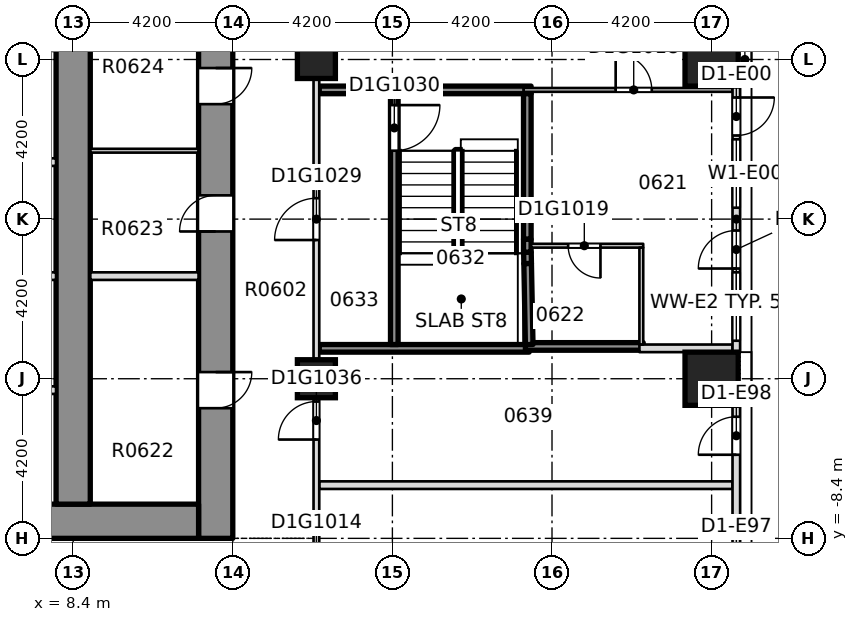
"""IFC4 building model, lengths in metres.
Left out: names, types, materials, properties, quantities, classifications, styles, units other than length and angle.
Written with IfcOpenShell. Run it as: python <this file> out.ifc"""

import sys

from ifc_helpers import new_model, si_unit, direction, frame, frame_2d, origin, origin_2d, place, context, subcontext, project, spatial, rectangle, extrude, element, fill, save


model = new_model("IFC4")
c1 = context("Model", 3, precision=1e-05, world=origin(), true_north=direction((0.0, 1.0)))
c2 = subcontext(c1, "Body", "Model", "MODEL_VIEW")
j1 = project(units=[si_unit("LENGTHUNIT", "METRE"), si_unit("PLANEANGLEUNIT", "RADIAN")], contexts=[c1])
p1 = place(None, origin())
s1 = spatial("IfcSite", under=j1, at=p1, CompositionType="ELEMENT")
p2 = place(p1, origin())
s2 = spatial("IfcBuilding", under=s1, at=p2, CompositionType="ELEMENT")
p3 = place(p2, frame((0.0, 0.0, 34.5)))
s3 = spatial("IfcBuildingStorey", under=s2, at=p3, CompositionType="ELEMENT", Elevation=34.5)
p4 = place(p3, frame((12.15, -8.4, -0.32), z_axis=(0.0, 0.0, 1.0), x_axis=(0.0, 1.0, 0.0)))
e1 = element("IfcWall", 1, at=p4, inside=s3, PredefinedType="SHEAR", context=c2, shape_type="SweptSolid", body=[
    extrude(rectangle(XDim=30.15, YDim=0.9, at=frame_2d((15.075, 0.0))), origin(), (0.0, 0.0, 1.0), 3.45),
])
p5 = place(p4, frame((3.425, 0.0, 0.32)))
e2 = element("IfcOpeningElement", 2, at=p5, cuts=e1, PredefinedType="OPENING", context=c2, shape_type="SweptSolid", body=[
    extrude(rectangle(XDim=0.95, YDim=2.1, at=frame_2d((0.475, 1.05))), frame((0.0, 0.46, 0.0), z_axis=(0.0, -1.0, 0.0), x_axis=(1.0, 0.0, 0.0)), (0.0, 0.0, 1.0), 0.92),
])
p6 = place(p4, frame((8.075, 0.0, 0.32)))
e3 = element("IfcOpeningElement", 3, at=p6, cuts=e1, PredefinedType="OPENING", context=c2, shape_type="SweptSolid", body=[
    extrude(rectangle(XDim=0.95, YDim=2.1, at=frame_2d((0.475, 1.05))), frame((0.0, 0.46, 0.0), z_axis=(0.0, -1.0, 0.0), x_axis=(1.0, 0.0, 0.0)), (0.0, 0.0, 1.0), 0.92),
])
p7 = place(p4, frame((11.425, 0.0, 0.32)))
e4 = element("IfcOpeningElement", 4, at=p7, cuts=e1, PredefinedType="OPENING", context=c2, shape_type="SweptSolid", body=[
    extrude(rectangle(XDim=0.95, YDim=2.1, at=frame_2d((0.475, 1.05))), frame((0.0, 0.46, 0.0), z_axis=(0.0, -1.0, 0.0), x_axis=(1.0, 0.0, 0.0)), (0.0, 0.0, 1.0), 0.92),
])
p8 = place(p4, frame((15.625, 0.0, 0.32)))
e5 = element("IfcOpeningElement", 5, at=p8, cuts=e1, PredefinedType="OPENING", context=c2, shape_type="SweptSolid", body=[
    extrude(rectangle(XDim=0.95, YDim=2.1, at=frame_2d((0.475, 1.05))), frame((0.0, 0.46, 0.0), z_axis=(0.0, -1.0, 0.0), x_axis=(1.0, 0.0, 0.0)), (0.0, 0.0, 1.0), 0.92),
])
p9 = place(p4, frame((22.725, 0.0, 0.32)))
e6 = element("IfcOpeningElement", 6, at=p9, cuts=e1, PredefinedType="OPENING", context=c2, shape_type="SweptSolid", body=[
    extrude(rectangle(XDim=0.95, YDim=2.1, at=frame_2d((0.475, 1.05))), frame((0.0, 0.46, 0.0), z_axis=(0.0, -1.0, 0.0), x_axis=(1.0, 0.0, 0.0)), (0.0, 0.0, 1.0), 0.92),
])
p10 = place(p4, frame((26.75, 0.0, 0.32)))
e7 = element("IfcOpeningElement", 7, at=p10, cuts=e1, PredefinedType="OPENING", context=c2, shape_type="SweptSolid", body=[
    extrude(rectangle(XDim=0.95, YDim=2.1, at=frame_2d((0.475, 1.05))), frame((0.0, 0.46, 0.0), z_axis=(0.0, -1.0, 0.0), x_axis=(1.0, 0.0, 0.0)), (0.0, 0.0, 1.0), 0.92),
])
p11 = place(p4, frame((19.3, 0.0, 0.32)))
e8 = element("IfcOpeningElement", 8, at=p11, cuts=e1, PredefinedType="OPENING", context=c2, shape_type="SweptSolid", body=[
    extrude(rectangle(XDim=1.2, YDim=2.1, at=frame_2d((0.6, 1.05))), frame((0.0, 0.46, 0.0), z_axis=(0.0, -1.0, 0.0), x_axis=(1.0, 0.0, 0.0)), (0.0, 0.0, 1.0), 0.92),
])
p12 = place(p3, frame((-11.7, -7.95, -0.32), z_axis=(0.0, 0.0, 1.0), x_axis=(1.0, 0.0, 0.0)))
e9 = element("IfcWall", 9, at=p12, inside=s3, PredefinedType="SHEAR", context=c2, shape_type="SweptSolid", body=[
    extrude(rectangle(XDim=23.4, YDim=0.9, at=frame_2d((11.7, 0.0))), origin(), (0.0, 0.0, 1.0), 3.45),
])
p13 = place(p12, frame((6.95, 0.0, 0.32)))
e10 = element("IfcOpeningElement", 10, at=p13, cuts=e9, PredefinedType="OPENING", context=c2, shape_type="SweptSolid", body=[
    extrude(rectangle(XDim=1.8, YDim=2.1, at=frame_2d((0.9, 1.05))), frame((0.0, 0.46, 0.0), z_axis=(0.0, -1.0, 0.0), x_axis=(1.0, 0.0, 0.0)), (0.0, 0.0, 1.0), 0.92),
])
p14 = place(p12, frame((14.65, 0.0, 0.32)))
e11 = element("IfcOpeningElement", 11, at=p14, cuts=e9, PredefinedType="OPENING", context=c2, shape_type="SweptSolid", body=[
    extrude(rectangle(XDim=1.8, YDim=2.1, at=frame_2d((0.9, 1.05))), frame((0.0, 0.46, 0.0), z_axis=(0.0, -1.0, 0.0), x_axis=(1.0, 0.0, 0.0)), (0.0, 0.0, 1.0), 0.92),
])
p15 = place(p3, frame((8.4, -7.5, -0.32), z_axis=(0.0, 0.0, 1.0), x_axis=(0.0, 1.0, 0.0)))
e12 = element("IfcWall", 12, at=p15, inside=s3, PredefinedType="SHEAR", context=c2, shape_type="SweptSolid", body=[
    extrude(rectangle(XDim=28.35, YDim=0.9, at=frame_2d((14.175, 0.0))), origin(), (0.0, 0.0, 1.0), 3.45),
])
p16 = place(p15, frame((18.4, 0.0, 0.32)))
e13 = element("IfcOpeningElement", 13, at=p16, cuts=e12, PredefinedType="OPENING", context=c2, shape_type="SweptSolid", body=[
    extrude(rectangle(XDim=1.2, YDim=2.1, at=frame_2d((0.6, 1.05))), frame((0.0, 0.46, 0.0), z_axis=(0.0, -1.0, 0.0), x_axis=(1.0, 0.0, 0.0)), (0.0, 0.0, 1.0), 0.92),
])
for number, where, z_axis, x_axis in (
    (14, (25.2, -4.2, -0.32), (0.0, 0.0, 1.0), (1.0, 0.0, 0.0)),
    (15, (25.2, 4.2, -0.32), (0.0, 0.0, 1.0), (1.0, 0.0, 0.0)),
):
    element("IfcColumn", number, at=place(p3, frame(where, z_axis=z_axis, x_axis=x_axis)), inside=s3, PredefinedType="COLUMN", context=c2, shape_type="SweptSolid", body=[
        extrude(rectangle(XDim=1.4, YDim=1.4, at=origin_2d()), origin(), (0.0, 0.0, 1.0), 3.45),
    ])
for number, where, z_axis, x_axis in (
    (16, (14.8, -4.2, -0.32), (0.0, 0.0, 1.0), (1.0, 0.0, 0.0)),
    (17, (14.8, 4.2, -0.32), (0.0, 0.0, 1.0), (1.0, 0.0, 0.0)),
):
    element("IfcColumn", number, at=place(p3, frame(where, z_axis=z_axis, x_axis=x_axis)), inside=s3, PredefinedType="COLUMN", context=c2, shape_type="SweptSolid", body=[
        extrude(rectangle(XDim=1.0, YDim=1.0, at=origin_2d()), origin(), (0.0, 0.0, 1.0), 3.45),
    ])
p17 = place(p3, frame((14.875, -7.0, 0.0), z_axis=(0.0, 0.0, 1.0), x_axis=(1.0, 0.0, 0.0)))
e18 = element("IfcWall", 18, at=p17, inside=s3, PredefinedType="PARTITIONING", context=c2, shape_type="SweptSolid", body=[
    extrude(rectangle(XDim=10.875, YDim=0.2, at=frame_2d((5.438, 0.0))), origin(), (0.0, 0.0, 1.0), 3.13),
])
p18 = place(p3, frame((14.875, -3.4, 0.0), z_axis=(0.0, 0.0, 1.0), x_axis=(1.0, 0.0, 0.0)))
e19 = element("IfcWall", 19, at=p18, inside=s3, PredefinedType="SOLIDWALL", context=c2, shape_type="SweptSolid", body=[
    extrude(rectangle(XDim=5.525, YDim=0.2, at=frame_2d((2.762, 0.0))), origin(), (0.0, 0.0, 1.0), 3.13),
])
p19 = place(p3, frame((20.3, -3.35, 0.0), z_axis=(0.0, 0.0, 1.0), x_axis=(1.0, 0.0, 0.0)))
e20 = element("IfcWall", 20, at=p19, inside=s3, PredefinedType="SOLIDWALL", context=c2, shape_type="SweptSolid", body=[
    extrude(rectangle(XDim=3.1, YDim=0.2, at=frame_2d((1.55, 0.0))), origin(), (0.0, 0.0, 1.0), 3.13),
])
p20 = place(p3, frame((23.3, -3.4, 0.0), z_axis=(0.0, 0.0, 1.0), x_axis=(1.0, 0.0, 0.0)))
e21 = element("IfcWall", 21, at=p20, inside=s3, PredefinedType="PARTITIONING", context=c2, shape_type="SweptSolid", body=[
    extrude(rectangle(XDim=2.45, YDim=0.2, at=frame_2d((1.225, 0.0))), origin(), (0.0, 0.0, 1.0), 3.13),
])
p21 = place(p3, frame((20.45, -0.7, 0.0), z_axis=(0.0, 0.0, 1.0), x_axis=(1.0, 0.0, 0.0)))
e22 = element("IfcWall", 22, at=p21, inside=s3, PredefinedType="PARTITIONING", context=c2, shape_type="SweptSolid", body=[
    extrude(rectangle(XDim=2.95, YDim=0.1, at=frame_2d((1.475, 0.0))), origin(), (0.0, 0.0, 1.0), 3.13),
])
p22 = place(p21, frame((0.975, 0.0, 0.0)))
e23 = element("IfcOpeningElement", 23, at=p22, cuts=e22, PredefinedType="OPENING", context=c2, shape_type="SweptSolid", body=[
    extrude(rectangle(XDim=0.85, YDim=2.1, at=frame_2d((0.425, 1.05))), frame((0.0, 0.06, 0.0), z_axis=(0.0, -1.0, 0.0), x_axis=(1.0, 0.0, 0.0)), (0.0, 0.0, 1.0), 0.12),
])
p23 = place(p3, frame((14.875, 3.4, 0.0), z_axis=(0.0, 0.0, 1.0), x_axis=(1.0, 0.0, 0.0)))
e24 = element("IfcWall", 24, at=p23, inside=s3, PredefinedType="SOLIDWALL", context=c2, shape_type="SweptSolid", body=[
    extrude(rectangle(XDim=5.575, YDim=0.2, at=frame_2d((2.788, 0.0))), origin(), (0.0, 0.0, 1.0), 3.13),
])
p24 = place(p3, frame((20.25, 3.4, 0.0), z_axis=(0.0, 0.0, 1.0), x_axis=(1.0, 0.0, 0.0)))
e25 = element("IfcWall", 25, at=p24, inside=s3, PredefinedType="PARTITIONING", context=c2, shape_type="SweptSolid", body=[
    extrude(rectangle(XDim=5.5, YDim=0.1, at=frame_2d((2.75, 0.0))), origin(), (0.0, 0.0, 1.0), 3.13),
])
p25 = place(p24, frame((2.425, 0.0, 0.0)))
e26 = element("IfcOpeningElement", 26, at=p25, cuts=e25, PredefinedType="OPENING", context=c2, shape_type="SweptSolid", body=[
    extrude(rectangle(XDim=0.95, YDim=2.1, at=frame_2d((0.475, 1.05))), frame((0.0, 0.06, 0.0), z_axis=(0.0, -1.0, 0.0), x_axis=(1.0, 0.0, 0.0)), (0.0, 0.0, 1.0), 0.12),
])
p26 = place(p3, frame((14.8, -10.525, 0.0), z_axis=(0.0, 0.0, 1.0), x_axis=(0.0, 1.0, 0.0)))
e27 = element("IfcWall", 27, at=p26, inside=s3, PredefinedType="PARTITIONING", context=c2, shape_type="SweptSolid", body=[
    extrude(rectangle(XDim=23.825, YDim=0.15, at=frame_2d((11.913, 0.0))), origin(), (0.0, 0.0, 1.0), 3.13),
])
p27 = place(p26, frame((0.925, 0.0, 0.0)))
e28 = element("IfcOpeningElement", 28, at=p27, cuts=e27, PredefinedType="OPENING", context=c2, shape_type="SweptSolid", body=[
    extrude(rectangle(XDim=1.0, YDim=2.1, at=frame_2d((0.5, 1.05))), frame((0.0, 0.085, 0.0), z_axis=(0.0, -1.0, 0.0), x_axis=(1.0, 0.0, 0.0)), (0.0, 0.0, 1.0), 0.17),
])
p28 = place(p26, frame((15.9, 0.0, 0.0)))
e29 = element("IfcOpeningElement", 29, at=p28, cuts=e27, PredefinedType="OPENING", context=c2, shape_type="SweptSolid", body=[
    extrude(rectangle(XDim=1.0, YDim=2.1, at=frame_2d((0.5, 1.05))), frame((0.0, 0.085, 0.0), z_axis=(0.0, -1.0, 0.0), x_axis=(1.0, 0.0, 0.0)), (0.0, 0.0, 1.0), 0.17),
])
p29 = place(p26, frame((20.9, 0.0, 0.0)))
e30 = element("IfcOpeningElement", 30, at=p29, cuts=e27, PredefinedType="OPENING", context=c2, shape_type="SweptSolid", body=[
    extrude(rectangle(XDim=0.95, YDim=2.1, at=frame_2d((0.475, 1.05))), frame((0.0, 0.085, 0.0), z_axis=(0.0, -1.0, 0.0), x_axis=(1.0, 0.0, 0.0)), (0.0, 0.0, 1.0), 0.17),
])
p30 = place(p26, frame((9.975, 0.0, 0.0)))
e31 = element("IfcOpeningElement", 31, at=p30, cuts=e27, PredefinedType="OPENING", context=c2, shape_type="SweptSolid", body=[
    extrude(rectangle(XDim=1.1, YDim=2.1, at=frame_2d((0.55, 1.05))), frame((0.0, 0.085, 0.0), z_axis=(0.0, -1.0, 0.0), x_axis=(1.0, 0.0, 0.0)), (0.0, 0.0, 1.0), 0.17),
])
p31 = place(p26, frame((4.725, 0.0, 0.0)))
e32 = element("IfcOpeningElement", 32, at=p31, cuts=e27, PredefinedType="OPENING", context=c2, shape_type="SweptSolid", body=[
    extrude(rectangle(XDim=1.0, YDim=2.1, at=frame_2d((0.5, 1.05))), frame((0.0, 0.085, 0.0), z_axis=(0.0, -1.0, 0.0), x_axis=(1.0, 0.0, 0.0)), (0.0, 0.0, 1.0), 0.17),
])
p32 = place(p3, frame((16.85, -3.3, 0.0), z_axis=(0.0, 0.0, 1.0), x_axis=(0.0, 1.0, 0.0)))
e33 = element("IfcWall", 33, at=p32, inside=s3, PredefinedType="SOLIDWALL", context=c2, shape_type="SweptSolid", body=[
    extrude(rectangle(XDim=6.6, YDim=0.2, at=frame_2d((3.3, 0.0))), origin(), (0.0, 0.0, 1.0), 3.13),
])
p33 = place(p32, frame((5.1, 0.0, 0.0)))
e34 = element("IfcOpeningElement", 34, at=p33, cuts=e33, PredefinedType="OPENING", context=c2, shape_type="SweptSolid", body=[
    extrude(rectangle(XDim=1.2, YDim=2.1, at=frame_2d((0.6, 1.05))), frame((0.0, 0.11, 0.0), z_axis=(0.0, -1.0, 0.0), x_axis=(1.0, 0.0, 0.0)), (0.0, 0.0, 1.0), 0.22),
])
p34 = place(p3, frame((20.359, -1.17, 0.0), z_axis=(0.0, 0.0, 1.0), x_axis=(-0.019540242435, 0.999809071236, 0.0)))
e35 = element("IfcWall", 35, at=p34, inside=s3, PredefinedType="SOLIDWALL", context=c2, shape_type="SweptSolid", body=[
    extrude(rectangle(XDim=0.3, YDim=0.2, at=frame_2d((0.15, 0.0))), origin(), (0.0, 0.0, 1.0), 3.13),
])
p35 = place(p3, frame((20.35, -0.53, 0.0), z_axis=(0.0, 0.0, 1.0), x_axis=(0.0, 1.0, 0.0)))
e36 = element("IfcWall", 36, at=p35, inside=s3, PredefinedType="SOLIDWALL", context=c2, shape_type="SweptSolid", body=[
    extrude(rectangle(XDim=3.83, YDim=0.2, at=frame_2d((1.915, 0.0))), origin(), (0.0, 0.0, 1.0), 3.13),
])
p36 = place(p3, frame((23.35, -3.3, 0.0), z_axis=(0.0, 0.0, 1.0), x_axis=(0.0, 1.0, 0.0)))
e37 = element("IfcWall", 37, at=p36, inside=s3, PredefinedType="PARTITIONING", context=c2, shape_type="SweptSolid", body=[
    extrude(rectangle(XDim=2.55, YDim=0.1, at=frame_2d((1.275, 0.0))), origin(), (0.0, 0.0, 1.0), 3.13),
])
p37 = place(p3, frame((25.85, -11.9, 0.0), z_axis=(0.0, 0.0, 1.0), x_axis=(0.0, 1.0, 0.0)))
e38 = element("IfcWall", 38, at=p37, inside=s3, PredefinedType="STANDARD", context=c2, shape_type="SweptSolid", body=[
    extrude(rectangle(XDim=7.0, YDim=0.2, at=frame_2d((3.5, 0.0))), origin(), (0.0, 0.0, 1.0), 3.13),
])
p38 = place(p37, frame((0.3, 0.0, 0.2)))
e39 = element("IfcOpeningElement", 39, at=p38, cuts=e38, PredefinedType="OPENING", context=c2, shape_type="SweptSolid", body=[
    extrude(rectangle(XDim=1.8, YDim=2.65, at=frame_2d((0.9, 1.325))), frame((0.0, 0.11, 0.0), z_axis=(0.0, -1.0, 0.0), x_axis=(1.0, 0.0, 0.0)), (0.0, 0.0, 1.0), 0.22),
])
p39 = place(p37, frame((2.2, 0.0, 0.0)))
e40 = element("IfcOpeningElement", 40, at=p39, cuts=e38, PredefinedType="OPENING", context=c2, shape_type="SweptSolid", body=[
    extrude(rectangle(XDim=1.0, YDim=2.4, at=frame_2d((0.5, 1.2))), frame((0.0, 0.11, 0.0), z_axis=(0.0, -1.0, 0.0), x_axis=(1.0, 0.0, 0.0)), (0.0, 0.0, 1.0), 0.22),
])
p40 = place(p37, frame((5.7, 0.0, 0.0)))
e41 = element("IfcOpeningElement", 41, at=p40, cuts=e38, PredefinedType="OPENING", context=c2, shape_type="SweptSolid", body=[
    extrude(rectangle(XDim=1.0, YDim=2.4, at=frame_2d((0.5, 1.2))), frame((0.0, 0.11, 0.0), z_axis=(0.0, -1.0, 0.0), x_axis=(1.0, 0.0, 0.0)), (0.0, 0.0, 1.0), 0.22),
])
p41 = place(p3, frame((25.85, -3.5, 0.0), z_axis=(0.0, 0.0, 1.0), x_axis=(0.0, 1.0, 0.0)))
e42 = element("IfcWall", 42, at=p41, inside=s3, PredefinedType="STANDARD", context=c2, shape_type="SweptSolid", body=[
    extrude(rectangle(XDim=7.0, YDim=0.2, at=frame_2d((3.5, 0.0))), origin(), (0.0, 0.0, 1.0), 3.13),
])
p42 = place(p41, frame((0.3, 0.0, 0.2)))
e43 = element("IfcOpeningElement", 43, at=p42, cuts=e42, PredefinedType="OPENING", context=c2, shape_type="SweptSolid", body=[
    extrude(rectangle(XDim=1.8, YDim=2.65, at=frame_2d((0.9, 1.325))), frame((0.0, 0.11, 0.0), z_axis=(0.0, -1.0, 0.0), x_axis=(1.0, 0.0, 0.0)), (0.0, 0.0, 1.0), 0.22),
])
p43 = place(p41, frame((2.2, 0.0, 0.0)))
e44 = element("IfcOpeningElement", 44, at=p43, cuts=e42, PredefinedType="OPENING", context=c2, shape_type="SweptSolid", body=[
    extrude(rectangle(XDim=1.0, YDim=2.4, at=frame_2d((0.5, 1.2))), frame((0.0, 0.11, 0.0), z_axis=(0.0, -1.0, 0.0), x_axis=(1.0, 0.0, 0.0)), (0.0, 0.0, 1.0), 0.22),
])
p44 = place(p41, frame((3.8, 0.0, 0.2)))
e45 = element("IfcOpeningElement", 45, at=p44, cuts=e42, PredefinedType="OPENING", context=c2, shape_type="SweptSolid", body=[
    extrude(rectangle(XDim=1.8, YDim=2.65, at=frame_2d((0.9, 1.325))), frame((0.0, 0.11, 0.0), z_axis=(0.0, -1.0, 0.0), x_axis=(1.0, 0.0, 0.0)), (0.0, 0.0, 1.0), 0.22),
])
p45 = place(p41, frame((5.7, 0.0, 0.0)))
e46 = element("IfcOpeningElement", 46, at=p45, cuts=e42, PredefinedType="OPENING", context=c2, shape_type="SweptSolid", body=[
    extrude(rectangle(XDim=1.0, YDim=2.4, at=frame_2d((0.5, 1.2))), frame((0.0, 0.11, 0.0), z_axis=(0.0, -1.0, 0.0), x_axis=(1.0, 0.0, 0.0)), (0.0, 0.0, 1.0), 0.22),
])
for number, where, z_axis, x_axis in (
    (47, (5.575, -4.5, 0.0), (0.0, 0.0, 1.0), (1.0, 0.0, 0.0)),
    (48, (5.575, -1.5, 0.0), (0.0, 0.0, 1.0), (1.0, 0.0, 0.0)),
    (49, (5.575, 1.5, 0.0), (0.0, 0.0, 1.0), (1.0, 0.0, 0.0)),
):
    element("IfcWall", number, at=place(p3, frame(where, z_axis=z_axis, x_axis=x_axis)), inside=s3, PredefinedType="PARTITIONING", context=c2, shape_type="SweptSolid", body=[
        extrude(rectangle(XDim=2.374, YDim=0.2, at=frame_2d((1.187, 0.0))), origin(), (0.0, 0.0, 1.0), 3.13),
    ])
p46 = place(p3, frame((8.851, -1.5, 0.0), z_axis=(0.0, 0.0, 1.0), x_axis=(1.0, 0.0, 0.0)))
e50 = element("IfcWall", 50, at=p46, inside=s3, PredefinedType="PARTITIONING", context=c2, shape_type="SweptSolid", body=[
    extrude(rectangle(XDim=2.848, YDim=0.2, at=frame_2d((1.424, 0.0))), origin(), (0.0, 0.0, 1.0), 3.13),
])
p47 = place(p3, frame((8.851, 1.8, 0.0), z_axis=(0.0, 0.0, 1.0), x_axis=(1.0, 0.0, 0.0)))
e51 = element("IfcWall", 51, at=p47, inside=s3, PredefinedType="PARTITIONING", context=c2, shape_type="SweptSolid", body=[
    extrude(rectangle(XDim=2.848, YDim=0.1, at=frame_2d((1.424, 0.0))), origin(), (0.0, 0.0, 1.0), 3.13),
])
p48 = place(p3, frame((20.35, -0.87, 0.0), z_axis=(0.0, 0.0, 1.0), x_axis=(0.0, 1.0, 0.0)))
e52 = element("IfcWall", 52, at=p48, inside=s3, PredefinedType="SOLIDWALL", context=c2, shape_type="SweptSolid", body=[
    extrude(rectangle(XDim=0.34, YDim=0.2, at=frame_2d((0.17, 0.0))), origin(), (0.0, 0.0, 1.0), 3.13),
])
p49 = place(p3, frame((20.4, -3.3, 0.0), z_axis=(0.0, 0.0, 1.0), x_axis=(-0.019251445867, 0.999814673743, 0.0)))
e53 = element("IfcWall", 53, at=p49, inside=s3, PredefinedType="SOLIDWALL", context=c2, shape_type="SweptSolid", body=[
    extrude(rectangle(XDim=2.131, YDim=0.2, at=frame_2d((1.065, 0.0))), origin(), (0.0, 0.0, 1.0), 3.13),
])
p50 = place(p25, origin())
e54 = element("IfcDoor", 54, at=p50, inside=s3, OperationType="SINGLE_SWING_LEFT", PredefinedType="DOOR", context=c2, shape_type="SweptSolid", body=[
    extrude(rectangle(XDim=0.95, YDim=2.1, at=frame_2d((0.475, 1.05))), frame((0.0, 0.025, 0.0), z_axis=(0.0, -1.0, 0.0), x_axis=(1.0, 0.0, 0.0)), (0.0, 0.0, 1.0), 0.05),
])
fill(e26, e54)
p51 = place(p22, origin())
e55 = element("IfcDoor", 55, at=p51, inside=s3, OperationType="SINGLE_SWING_RIGHT", PredefinedType="DOOR", context=c2, shape_type="SweptSolid", body=[
    extrude(rectangle(XDim=0.85, YDim=2.1, at=frame_2d((0.425, 1.05))), frame((0.0, 0.025, 0.0), z_axis=(0.0, -1.0, 0.0), x_axis=(1.0, 0.0, 0.0)), (0.0, 0.0, 1.0), 0.05),
])
fill(e23, e55)
p52 = place(p30, origin())
e56 = element("IfcDoor", 56, at=p52, inside=s3, OperationType="SINGLE_SWING_LEFT", PredefinedType="DOOR", context=c2, shape_type="SweptSolid", body=[
    extrude(rectangle(XDim=1.1, YDim=2.1, at=frame_2d((0.55, 1.05))), frame((0.0, 0.025, 0.0), z_axis=(0.0, -1.0, 0.0), x_axis=(1.0, 0.0, 0.0)), (0.0, 0.0, 1.0), 0.05),
])
fill(e31, e56)
p53 = place(p33, origin())
e57 = element("IfcDoor", 57, at=p53, inside=s3, OperationType="SINGLE_SWING_LEFT", PredefinedType="DOOR", context=c2, shape_type="SweptSolid", body=[
    extrude(rectangle(XDim=1.2, YDim=2.1, at=frame_2d((0.6, 1.05))), frame((0.0, 0.025, 0.0), z_axis=(0.0, -1.0, 0.0), x_axis=(1.0, 0.0, 0.0)), (0.0, 0.0, 1.0), 0.05),
])
fill(e34, e57)
p54 = place(p31, origin())
e58 = element("IfcDoor", 58, at=p54, inside=s3, OperationType="SINGLE_SWING_RIGHT", PredefinedType="DOOR", context=c2, shape_type="SweptSolid", body=[
    extrude(rectangle(XDim=1.0, YDim=2.1, at=frame_2d((0.5, 1.05))), frame((0.0, 0.025, 0.0), z_axis=(0.0, -1.0, 0.0), x_axis=(1.0, 0.0, 0.0)), (0.0, 0.0, 1.0), 0.05),
])
fill(e32, e58)
p55 = place(p40, origin())
e59 = element("IfcDoor", 59, at=p55, inside=s3, OperationType="SINGLE_SWING_LEFT", PredefinedType="DOOR", context=c2, shape_type="SweptSolid", body=[
    extrude(rectangle(XDim=1.0, YDim=2.4, at=frame_2d((0.5, 1.2))), frame((0.0, 0.025, 0.0), z_axis=(0.0, -1.0, 0.0), x_axis=(1.0, 0.0, 0.0)), (0.0, 0.0, 1.0), 0.05),
])
fill(e41, e59)
p56 = place(p42, origin())
e60 = element("IfcWindow", 60, at=p56, inside=s3, PartitioningType="SINGLE_PANEL", PredefinedType="WINDOW", context=c2, shape_type="SweptSolid", body=[
    extrude(rectangle(XDim=1.8, YDim=2.65, at=frame_2d((0.9, 1.325))), frame((0.0, 0.03, 0.0), z_axis=(0.0, -1.0, 0.0), x_axis=(1.0, 0.0, 0.0)), (0.0, 0.0, 1.0), 0.06),
])
fill(e43, e60)
p57 = place(p43, origin())
e61 = element("IfcDoor", 61, at=p57, inside=s3, OperationType="SINGLE_SWING_LEFT", PredefinedType="DOOR", context=c2, shape_type="SweptSolid", body=[
    extrude(rectangle(XDim=1.0, YDim=2.4, at=frame_2d((0.5, 1.2))), frame((0.0, 0.025, 0.0), z_axis=(0.0, -1.0, 0.0), x_axis=(1.0, 0.0, 0.0)), (0.0, 0.0, 1.0), 0.05),
])
fill(e44, e61)
p58 = place(p44, origin())
e62 = element("IfcWindow", 62, at=p58, inside=s3, PartitioningType="SINGLE_PANEL", PredefinedType="WINDOW", context=c2, shape_type="SweptSolid", body=[
    extrude(rectangle(XDim=1.8, YDim=2.65, at=frame_2d((0.9, 1.325))), frame((0.0, 0.03, 0.0), z_axis=(0.0, -1.0, 0.0), x_axis=(1.0, 0.0, 0.0)), (0.0, 0.0, 1.0), 0.06),
])
fill(e45, e62)
p59 = place(p45, origin())
e63 = element("IfcDoor", 63, at=p59, inside=s3, OperationType="SINGLE_SWING_LEFT", PredefinedType="DOOR", context=c2, shape_type="SweptSolid", body=[
    extrude(rectangle(XDim=1.0, YDim=2.4, at=frame_2d((0.5, 1.2))), frame((0.0, 0.025, 0.0), z_axis=(0.0, -1.0, 0.0), x_axis=(1.0, 0.0, 0.0)), (0.0, 0.0, 1.0), 0.05),
])
fill(e46, e63)
p60 = place(p5, origin())
e64 = element("IfcDoor", 64, at=p60, inside=s3, OperationType="SINGLE_SWING_LEFT", PredefinedType="DOOR", context=c2, shape_type="SweptSolid", body=[
    extrude(rectangle(XDim=0.95, YDim=2.1, at=frame_2d((0.475, 1.05))), frame((0.0, 0.025, 0.0), z_axis=(0.0, -1.0, 0.0), x_axis=(1.0, 0.0, 0.0)), (0.0, 0.0, 1.0), 0.05),
])
fill(e2, e64)
p61 = place(p6, origin())
e65 = element("IfcDoor", 65, at=p61, inside=s3, OperationType="SINGLE_SWING_LEFT", PredefinedType="DOOR", context=c2, shape_type="SweptSolid", body=[
    extrude(rectangle(XDim=0.95, YDim=2.1, at=frame_2d((0.475, 1.05))), frame((0.0, 0.025, 0.0), z_axis=(0.0, -1.0, 0.0), x_axis=(1.0, 0.0, 0.0)), (0.0, 0.0, 1.0), 0.05),
])
fill(e3, e65)
p62 = place(p7, origin())
e66 = element("IfcDoor", 66, at=p62, inside=s3, OperationType="SINGLE_SWING_LEFT", PredefinedType="DOOR", context=c2, shape_type="SweptSolid", body=[
    extrude(rectangle(XDim=0.95, YDim=2.1, at=frame_2d((0.475, 1.05))), frame((0.0, 0.025, 0.0), z_axis=(0.0, -1.0, 0.0), x_axis=(1.0, 0.0, 0.0)), (0.0, 0.0, 1.0), 0.05),
])
fill(e4, e66)
save(model, sys.argv[1])
